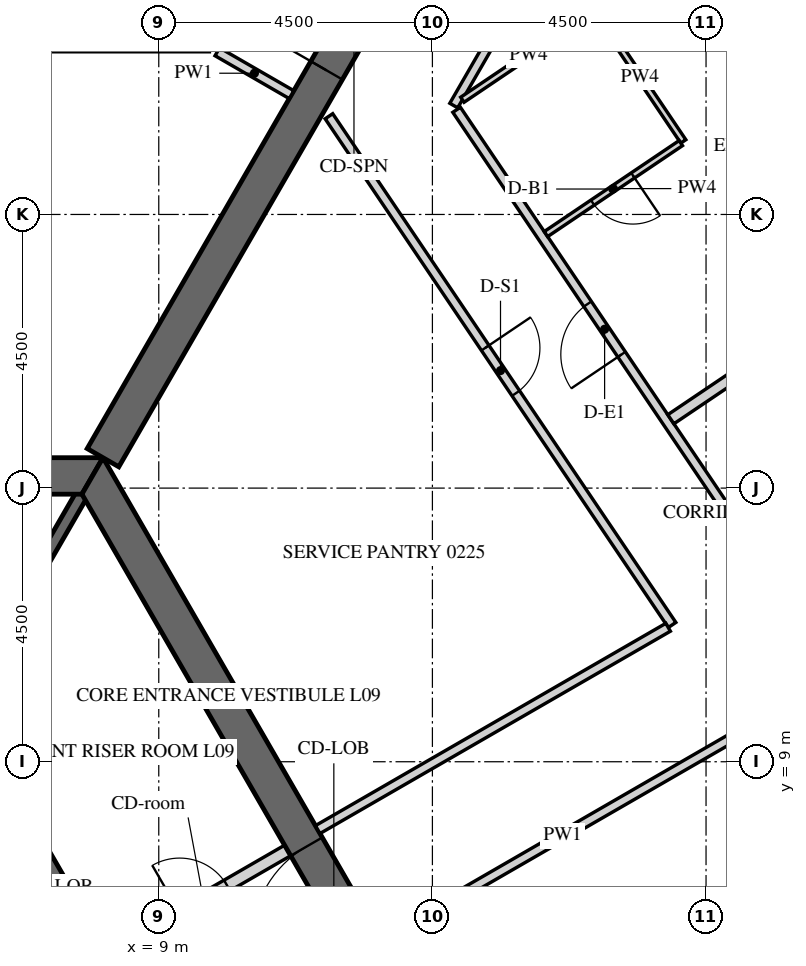
"""IFC4 building model, lengths in metres.
Left out: names, types, materials, properties, quantities, classifications, styles, units other than length and angle.
Written with IfcOpenShell. Run it as: python <this file> out.ifc"""

import sys

from ifc_helpers import new_model, si_unit, direction, frame, frame_2d, origin, place, context, subcontext, project, spatial, polyline, rectangle, outline, extrude, element, fill, save


model = new_model("IFC4")
c1 = context("Model", 3, precision=1e-05, world=origin(), true_north=direction((0.0, 1.0)))
c2 = subcontext(c1, "Body", "Model", "MODEL_VIEW")
j1 = project(units=[si_unit("LENGTHUNIT", "METRE"), si_unit("PLANEANGLEUNIT", "RADIAN")], contexts=[c1])
p1 = place(None, origin())
s1 = spatial("IfcSite", under=j1, at=p1, CompositionType="ELEMENT")
p2 = place(p1, origin())
s2 = spatial("IfcBuilding", under=s1, at=p2, CompositionType="ELEMENT")
p3 = place(p2, frame((0.0, 0.0, 49.2)))
s3 = spatial("IfcBuildingStorey", under=s2, at=p3, CompositionType="ELEMENT", Elevation=49.2)
p4 = place(p3, frame((33.728, 3.153, -0.15), z_axis=(0.0, 0.0, 1.0), x_axis=(-0.559192411416, 0.82903790445, 0.0)))
e1 = element("IfcWall", 1, at=p4, inside=s3, PredefinedType="SOLIDWALL", context=c2, shape_type="SweptSolid", body=[
    extrude(outline(polyline([(-0.026, -0.275), (30.093, -0.275), (30.048, 0.275), (0.026, 0.275), (-0.026, -0.275)])), origin(), (0.0, 0.0, 1.0), 3.9),
])
p5 = place(p4, frame((1.236, 0.0, 1.05)))
e2 = element("IfcOpeningElement", 2, at=p5, cuts=e1, PredefinedType="OPENING", context=c2, shape_type="SweptSolid", body=[
    extrude(rectangle(XDim=2.4, YDim=2.4, at=frame_2d((1.2, 1.2))), frame((0.0, 0.285, 0.0), z_axis=(0.0, -1.0, 0.0), x_axis=(1.0, 0.0, 0.0)), (0.0, 0.0, 1.0), 0.57),
])
p6 = place(p4, frame((4.835, 0.0, 1.05)))
e3 = element("IfcOpeningElement", 3, at=p6, cuts=e1, PredefinedType="OPENING", context=c2, shape_type="SweptSolid", body=[
    extrude(rectangle(XDim=2.4, YDim=2.4, at=frame_2d((1.2, 1.2))), frame((0.0, 0.285, 0.0), z_axis=(0.0, -1.0, 0.0), x_axis=(1.0, 0.0, 0.0)), (0.0, 0.0, 1.0), 0.57),
])
p7 = place(p4, frame((8.436, 0.0, 1.05)))
e4 = element("IfcOpeningElement", 4, at=p7, cuts=e1, PredefinedType="OPENING", context=c2, shape_type="SweptSolid", body=[
    extrude(rectangle(XDim=2.4, YDim=2.4, at=frame_2d((1.2, 1.2))), frame((0.0, 0.285, 0.0), z_axis=(0.0, -1.0, 0.0), x_axis=(1.0, 0.0, 0.0)), (0.0, 0.0, 1.0), 0.57),
])
p8 = place(p4, frame((12.035, 0.0, 1.05)))
e5 = element("IfcOpeningElement", 5, at=p8, cuts=e1, PredefinedType="OPENING", context=c2, shape_type="SweptSolid", body=[
    extrude(rectangle(XDim=2.4, YDim=2.4, at=frame_2d((1.2, 1.2))), frame((0.0, 0.285, 0.0), z_axis=(0.0, -1.0, 0.0), x_axis=(1.0, 0.0, 0.0)), (0.0, 0.0, 1.0), 0.57),
])
p9 = place(p4, frame((15.635, 0.0, 1.05)))
e6 = element("IfcOpeningElement", 6, at=p9, cuts=e1, PredefinedType="OPENING", context=c2, shape_type="SweptSolid", body=[
    extrude(rectangle(XDim=2.4, YDim=2.4, at=frame_2d((1.2, 1.2))), frame((0.0, 0.285, 0.0), z_axis=(0.0, -1.0, 0.0), x_axis=(1.0, 0.0, 0.0)), (0.0, 0.0, 1.0), 0.57),
])
p10 = place(p4, frame((19.236, 0.0, 1.05)))
e7 = element("IfcOpeningElement", 7, at=p10, cuts=e1, PredefinedType="OPENING", context=c2, shape_type="SweptSolid", body=[
    extrude(rectangle(XDim=2.4, YDim=2.4, at=frame_2d((1.2, 1.2))), frame((0.0, 0.285, 0.0), z_axis=(0.0, -1.0, 0.0), x_axis=(1.0, 0.0, 0.0)), (0.0, 0.0, 1.0), 0.57),
])
p11 = place(p4, frame((22.835, 0.0, 1.05)))
e8 = element("IfcOpeningElement", 8, at=p11, cuts=e1, PredefinedType="OPENING", context=c2, shape_type="SweptSolid", body=[
    extrude(rectangle(XDim=2.4, YDim=2.4, at=frame_2d((1.2, 1.2))), frame((0.0, 0.285, 0.0), z_axis=(0.0, -1.0, 0.0), x_axis=(1.0, 0.0, 0.0)), (0.0, 0.0, 1.0), 0.57),
])
p12 = place(p4, frame((26.436, 0.0, 1.05)))
e9 = element("IfcOpeningElement", 9, at=p12, cuts=e1, PredefinedType="OPENING", context=c2, shape_type="SweptSolid", body=[
    extrude(rectangle(XDim=2.4, YDim=2.4, at=frame_2d((1.2, 1.2))), frame((0.0, 0.285, 0.0), z_axis=(0.0, -1.0, 0.0), x_axis=(1.0, 0.0, 0.0)), (0.0, 0.0, 1.0), 0.57),
])
p13 = place(p3, frame((15.819, 0.0, -0.15), z_axis=(0.0, 0.0, 1.0), x_axis=(-0.499999880136, 0.866025472988, 0.0)))
e10 = element("IfcWall", 10, at=p13, inside=s3, PredefinedType="SHEAR", context=c2, shape_type="SweptSolid", body=[
    extrude(outline(polyline([(-0.173, -0.3), (15.993, -0.3), (15.646, 0.3), (0.173, 0.3), (-0.173, -0.3)])), origin(), (0.0, 0.0, 1.0), 3.9),
])
p14 = place(p13, frame((6.981, 0.0, 0.15)))
e11 = element("IfcOpeningElement", 11, at=p14, cuts=e10, PredefinedType="OPENING", context=c2, shape_type="SweptSolid", body=[
    extrude(rectangle(XDim=1.8, YDim=2.4, at=frame_2d((0.9, 1.2))), frame((0.0, 0.31, 0.0), z_axis=(0.0, -1.0, 0.0), x_axis=(1.0, 0.0, 0.0)), (0.0, 0.0, 1.0), 0.62),
])
p15 = place(p3, frame((7.91, 13.7, -0.15), z_axis=(0.0, 0.0, 1.0), x_axis=(-1.0, 0.0, 0.0)))
e12 = element("IfcWall", 12, at=p15, inside=s3, PredefinedType="SHEAR", context=c2, shape_type="SweptSolid", body=[
    extrude(outline(polyline([(-0.173, -0.3), (15.993, -0.3), (15.646, 0.3), (0.173, 0.3), (-0.173, -0.3)])), origin(), (0.0, 0.0, 1.0), 3.9),
])
p16 = place(p15, frame((7.31, 0.0, 0.15)))
e13 = element("IfcOpeningElement", 13, at=p16, cuts=e12, PredefinedType="OPENING", context=c2, shape_type="SweptSolid", body=[
    extrude(rectangle(XDim=1.2, YDim=2.4, at=frame_2d((0.6, 1.2))), frame((0.0, 0.31, 0.0), z_axis=(0.0, -1.0, 0.0), x_axis=(1.0, 0.0, 0.0)), (0.0, 0.0, 1.0), 0.62),
])
p17 = place(p3, frame((8.083, 14.0, -0.15), z_axis=(0.0, 0.0, 1.0), x_axis=(0.499997680643, 0.866026742862, 0.0)))
e14 = element("IfcWall", 14, at=p17, inside=s3, PredefinedType="SHEAR", context=c2, shape_type="SweptSolid", body=[
    extrude(rectangle(XDim=16.509, YDim=0.6, at=frame_2d((8.254, 0.0))), origin(), (0.0, 0.0, 1.0), 3.9),
])
p18 = place(p17, frame((7.354, 0.0, 0.15)))
e15 = element("IfcOpeningElement", 15, at=p18, cuts=e14, PredefinedType="OPENING", context=c2, shape_type="SweptSolid", body=[
    extrude(rectangle(XDim=1.8, YDim=2.4, at=frame_2d((0.9, 1.2))), frame((0.0, 0.31, 0.0), z_axis=(0.0, -1.0, 0.0), x_axis=(1.0, 0.0, 0.0)), (0.0, 0.0, 1.0), 0.62),
])
p19 = place(p3, frame((11.345, 0.0, -0.15), z_axis=(0.0, 0.0, 1.0), x_axis=(-0.499995046907, 0.866028263435, 0.0)))
e16 = element("IfcWall", 16, at=p19, inside=s3, PredefinedType="SHEAR", context=c2, shape_type="SweptSolid", body=[
    extrude(outline(polyline([(-0.101, -0.175), (11.446, -0.175), (11.244, 0.175), (0.101, 0.175), (-0.101, -0.175)])), origin(), (0.0, 0.0, 1.0), 3.9),
])
p20 = place(p19, frame((4.744, 0.0, 0.15)))
e17 = element("IfcOpeningElement", 17, at=p20, cuts=e16, PredefinedType="OPENING", context=c2, shape_type="SweptSolid", body=[
    extrude(rectangle(XDim=1.8, YDim=2.4, at=frame_2d((0.9, 1.2))), frame((0.0, 0.185, 0.0), z_axis=(0.0, -1.0, 0.0), x_axis=(1.0, 0.0, 0.0)), (0.0, 0.0, 1.0), 0.37),
])
p21 = place(p3, frame((5.773, 10.0, -0.15), z_axis=(0.0, 0.0, 1.0), x_axis=(0.500038251005, 0.86600331843, 0.0)))
e18 = element("IfcWall", 18, at=p21, inside=s3, PredefinedType="SHEAR", context=c2, shape_type="SweptSolid", body=[
    extrude(rectangle(XDim=3.926, YDim=0.2, at=frame_2d((1.963, 0.0))), origin(), (0.0, 0.0, 1.0), 3.9),
])
p22 = place(p3, frame((8.175, 5.841, 0.0), z_axis=(0.0, 0.0, 1.0), x_axis=(0.866020560687, 0.500008388397, 0.0)))
e19 = element("IfcWall", 19, at=p22, inside=s3, PredefinedType="PARTITIONING", context=c2, shape_type="SweptSolid", body=[
    extrude(rectangle(XDim=3.4, YDim=0.2, at=frame_2d((1.7, 0.0))), origin(), (0.0, 0.0, 1.0), 3.65),
])
p23 = place(p22, frame((1.35, 0.0, 0.0)))
e20 = element("IfcOpeningElement", 20, at=p23, cuts=e19, PredefinedType="OPENING", context=c2, shape_type="SweptSolid", body=[
    extrude(rectangle(XDim=0.9, YDim=2.1, at=frame_2d((0.45, 1.05))), frame((0.0, 0.11, 0.0), z_axis=(0.0, -1.0, 0.0), x_axis=(1.0, 0.0, 0.0)), (0.0, 0.0, 1.0), 0.22),
])
p24 = place(p3, frame((9.963, 20.675, 0.0), z_axis=(0.0, 0.0, 1.0), x_axis=(0.865963438852, -0.500107311056, 0.0)))
e21 = element("IfcWall", 21, at=p24, inside=s3, PredefinedType="PARTITIONING", context=c2, shape_type="SweptSolid", body=[
    extrude(rectangle(XDim=1.409, YDim=0.15, at=frame_2d((0.705, 0.0))), origin(), (0.0, 0.0, 1.0), 2.988),
])
p25 = place(p3, frame((26.528, 0.997, 0.0), z_axis=(0.0, 0.0, 1.0), x_axis=(-0.559192121846, 0.829038099767, 0.0)))
e22 = element("IfcWall", 22, at=p25, inside=s3, PredefinedType="PARTITIONING", context=c2, shape_type="SweptSolid", body=[
    extrude(rectangle(XDim=22.586, YDim=0.15, at=frame_2d((11.293, 0.0))), origin(), (0.0, 0.0, 1.0), 2.988),
])
p26 = place(p25, frame((11.696, 0.0, 0.0)))
e23 = element("IfcOpeningElement", 23, at=p26, cuts=e22, PredefinedType="OPENING", context=c2, shape_type="SweptSolid", body=[
    extrude(rectangle(XDim=1.0, YDim=2.1, at=frame_2d((0.5, 1.05))), frame((0.0, 0.085, 0.0), z_axis=(0.0, -1.0, 0.0), x_axis=(1.0, 0.0, 0.0)), (0.0, 0.0, 1.0), 0.17),
])
p27 = place(p25, frame((17.733, 0.0, 0.0)))
e24 = element("IfcOpeningElement", 24, at=p27, cuts=e22, PredefinedType="OPENING", context=c2, shape_type="SweptSolid", body=[
    extrude(rectangle(XDim=1.0, YDim=2.1, at=frame_2d((0.5, 1.05))), frame((0.0, 0.085, 0.0), z_axis=(0.0, -1.0, 0.0), x_axis=(1.0, 0.0, 0.0)), (0.0, 0.0, 1.0), 0.17),
])
p28 = place(p3, frame((13.851, 19.791, 0.0), z_axis=(0.0, 0.0, 1.0), x_axis=(0.499986449875, 0.866033226812, 0.0)))
e25 = element("IfcWall", 25, at=p28, inside=s3, PredefinedType="PARTITIONING", context=c2, shape_type="SweptSolid", body=[
    extrude(rectangle(XDim=3.255, YDim=0.15, at=frame_2d((1.628, 0.0))), origin(), (0.0, 0.0, 1.0), 2.988),
])
p29 = place(p3, frame((12.664, 6.066, 0.0), z_axis=(0.0, 0.0, 1.0), x_axis=(0.866027716353, 0.499995994493, 0.0)))
e26 = element("IfcWall", 26, at=p29, inside=s3, PredefinedType="PARTITIONING", context=c2, shape_type="SweptSolid", body=[
    extrude(rectangle(XDim=6.876, YDim=0.15, at=frame_2d((3.438, 0.0))), origin(), (0.0, 0.0, 1.0), 2.988),
])
p30 = place(p3, frame((11.798, 19.615, 0.0), z_axis=(0.0, 0.0, 1.0), x_axis=(0.559191941468, -0.829038221434, 0.0)))
e27 = element("IfcWall", 27, at=p30, inside=s3, PredefinedType="PARTITIONING", context=c2, shape_type="SweptSolid", body=[
    extrude(rectangle(XDim=10.092, YDim=0.15, at=frame_2d((5.046, 0.0))), origin(), (0.0, 0.0, 1.0), 2.988),
])
p31 = place(p30, frame((4.596, 0.0, 0.0)))
e28 = element("IfcOpeningElement", 28, at=p31, cuts=e27, PredefinedType="OPENING", context=c2, shape_type="SweptSolid", body=[
    extrude(rectangle(XDim=0.9, YDim=2.1, at=frame_2d((0.45, 1.05))), frame((0.0, 0.085, 0.0), z_axis=(0.0, -1.0, 0.0), x_axis=(1.0, 0.0, 0.0)), (0.0, 0.0, 1.0), 0.17),
])
p32 = place(p3, frame((17.376, 11.211, 0.0), z_axis=(0.0, 0.0, 1.0), x_axis=(-0.866021841149, -0.500006170614, 0.0)))
e29 = element("IfcWall", 29, at=p32, inside=s3, PredefinedType="PARTITIONING", context=c2, shape_type="SweptSolid", body=[
    extrude(rectangle(XDim=6.654, YDim=0.15, at=frame_2d((3.327, 0.0))), origin(), (0.0, 0.0, 1.0), 2.988),
])
p33 = place(p3, frame((23.079, 18.449, 0.0), z_axis=(0.0, 0.0, 1.0), x_axis=(-0.829044361536, -0.559182838261, 0.0)))
e30 = element("IfcWall", 30, at=p33, inside=s3, PredefinedType="PARTITIONING", context=c2, shape_type="SweptSolid", body=[
    extrude(rectangle(XDim=6.825, YDim=0.18, at=frame_2d((3.413, 0.0))), origin(), (0.0, 0.0, 1.0), 2.988),
])
p34 = place(p3, frame((13.993, 19.886, 0.0), z_axis=(0.0, 0.0, 1.0), x_axis=(0.829009051057, 0.559235186005, 0.0)))
e31 = element("IfcWall", 31, at=p34, inside=s3, PredefinedType="PARTITIONING", context=c2, shape_type="SweptSolid", body=[
    extrude(rectangle(XDim=2.629, YDim=0.1, at=frame_2d((1.314, 0.0))), origin(), (0.0, 0.0, 1.0), 2.988),
])
p35 = place(p3, frame((16.2, 21.315, 0.0), z_axis=(0.0, 0.0, 1.0), x_axis=(0.559155442782, -0.829062838878, 0.0)))
e32 = element("IfcWall", 32, at=p35, inside=s3, PredefinedType="PARTITIONING", context=c2, shape_type="SweptSolid", body=[
    extrude(rectangle(XDim=2.55, YDim=0.1, at=frame_2d((1.275, 0.0))), origin(), (0.0, 0.0, 1.0), 2.988),
])
p36 = place(p3, frame((17.585, 19.173, 0.0), z_axis=(0.0, 0.0, 1.0), x_axis=(-0.82904753069, -0.559178139645, 0.0)))
e33 = element("IfcWall", 33, at=p36, inside=s3, PredefinedType="PARTITIONING", context=c2, shape_type="SweptSolid", body=[
    extrude(rectangle(XDim=2.675, YDim=0.1, at=frame_2d((1.337, 0.0))), origin(), (0.0, 0.0, 1.0), 2.988),
])
p37 = place(p36, frame((0.95, 0.0, 0.0)))
e34 = element("IfcOpeningElement", 34, at=p37, cuts=e33, PredefinedType="OPENING", context=c2, shape_type="SweptSolid", body=[
    extrude(rectangle(XDim=0.8, YDim=2.1, at=frame_2d((0.4, 1.05))), frame((0.0, 0.06, 0.0), z_axis=(0.0, -1.0, 0.0), x_axis=(1.0, 0.0, 0.0)), (0.0, 0.0, 1.0), 0.12),
])
p38 = place(p14, origin())
e35 = element("IfcDoor", 35, at=p38, inside=s3, OperationType="DOUBLE_DOOR_SINGLE_SWING", PredefinedType="DOOR", context=c2, shape_type="SweptSolid", body=[
    extrude(rectangle(XDim=1.8, YDim=2.4, at=frame_2d((0.9, 1.2))), frame((0.0, 0.025, 0.0), z_axis=(0.0, -1.0, 0.0), x_axis=(1.0, 0.0, 0.0)), (0.0, 0.0, 1.0), 0.05),
])
fill(e11, e35)
p39 = place(p18, origin())
e36 = element("IfcDoor", 36, at=p39, inside=s3, OperationType="DOUBLE_DOOR_SINGLE_SWING", PredefinedType="DOOR", context=c2, shape_type="SweptSolid", body=[
    extrude(rectangle(XDim=1.8, YDim=2.4, at=frame_2d((0.9, 1.2))), frame((0.0, 0.025, 0.0), z_axis=(0.0, -1.0, 0.0), x_axis=(1.0, 0.0, 0.0)), (0.0, 0.0, 1.0), 0.05),
])
fill(e15, e36)
p40 = place(p23, origin())
e37 = element("IfcDoor", 37, at=p40, inside=s3, OperationType="SINGLE_SWING_LEFT", PredefinedType="DOOR", context=c2, shape_type="SweptSolid", body=[
    extrude(rectangle(XDim=0.9, YDim=2.1, at=frame_2d((0.45, 1.05))), frame((0.0, 0.025, 0.0), z_axis=(0.0, -1.0, 0.0), x_axis=(1.0, 0.0, 0.0)), (0.0, 0.0, 1.0), 0.05),
])
fill(e20, e37)
p41 = place(p27, origin())
e38 = element("IfcDoor", 38, at=p41, inside=s3, OperationType="SINGLE_SWING_LEFT", PredefinedType="DOOR", context=c2, shape_type="SweptSolid", body=[
    extrude(rectangle(XDim=1.0, YDim=2.1, at=frame_2d((0.5, 1.05))), frame((0.0, 0.025, 0.0), z_axis=(0.0, -1.0, 0.0), x_axis=(1.0, 0.0, 0.0)), (0.0, 0.0, 1.0), 0.05),
])
fill(e24, e38)
p42 = place(p37, origin())
e39 = element("IfcDoor", 39, at=p42, inside=s3, OperationType="SINGLE_SWING_RIGHT", PredefinedType="DOOR", context=c2, shape_type="SweptSolid", body=[
    extrude(rectangle(XDim=0.8, YDim=2.1, at=frame_2d((0.4, 1.05))), frame((0.0, 0.025, 0.0), z_axis=(0.0, -1.0, 0.0), x_axis=(1.0, 0.0, 0.0)), (0.0, 0.0, 1.0), 0.05),
])
fill(e34, e39)
p43 = place(p31, origin())
e40 = element("IfcDoor", 40, at=p43, inside=s3, OperationType="SINGLE_SWING_LEFT", PredefinedType="DOOR", context=c2, shape_type="SweptSolid", body=[
    extrude(rectangle(XDim=0.9, YDim=2.1, at=frame_2d((0.45, 1.05))), frame((0.0, 0.025, 0.0), z_axis=(0.0, -1.0, 0.0), x_axis=(1.0, 0.0, 0.0)), (0.0, 0.0, 1.0), 0.05),
])
fill(e28, e40)
save(model, sys.argv[1])
